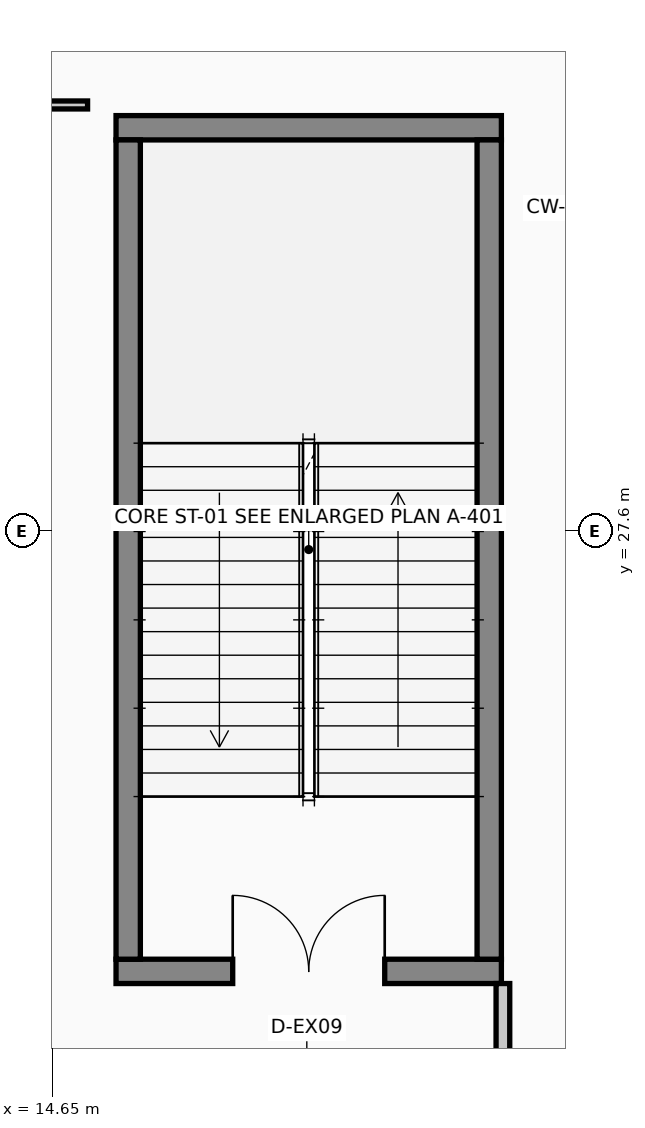
"""IFC4 building model, lengths in metres.
Left out: names, types, materials, properties, quantities, classifications, styles, units other than length and angle.
Written with IfcOpenShell. Run it as: python <this file> out.ifc"""

import sys

from ifc_helpers import new_model, si_unit, direction, frame, frame_2d, origin, place, context, subcontext, project, spatial, rectangle, extrude, element, fill, save


model = new_model("IFC4")
c1 = context("Model", 3, precision=1e-05, world=origin(), true_north=direction((0.0, 1.0)))
c2 = subcontext(c1, "Body", "Model", "MODEL_VIEW")
j1 = project(units=[si_unit("LENGTHUNIT", "METRE"), si_unit("PLANEANGLEUNIT", "RADIAN")], contexts=[c1])
p1 = place(None, origin())
s1 = spatial("IfcSite", under=j1, at=p1, CompositionType="ELEMENT")
p2 = place(p1, origin())
s2 = spatial("IfcBuilding", under=s1, at=p2, CompositionType="ELEMENT")
p3 = place(p2, origin())
s3 = spatial("IfcBuildingStorey", under=s2, at=p3, CompositionType="ELEMENT", Elevation=0.0)
p4 = place(p3, frame((15.49, 21.8, 0.0), z_axis=(0.0, 0.0, 1.0), x_axis=(1.0, 0.0, 0.0)))
e1 = element("IfcWall", 1, at=p4, inside=s3, PredefinedType="SHEAR", context=c2, shape_type="SweptSolid", body=[
    extrude(rectangle(XDim=5.07, YDim=0.32, at=frame_2d((2.535, 0.0))), origin(), (0.0, 0.0, 1.0), 4.58),
])
p5 = place(p4, frame((1.535, 0.0, 0.0)))
e2 = element("IfcOpeningElement", 2, at=p5, cuts=e1, PredefinedType="OPENING", context=c2, shape_type="SweptSolid", body=[
    extrude(rectangle(XDim=2.0, YDim=2.15, at=frame_2d((1.0, 1.075))), frame((0.0, 0.17, 0.0), z_axis=(0.0, -1.0, 0.0), x_axis=(1.0, 0.0, 0.0)), (0.0, 0.0, 1.0), 0.34),
])
p6 = place(p3, frame((15.49, 32.9, 0.0), z_axis=(0.0, 0.0, 1.0), x_axis=(1.0, 0.0, 0.0)))
e3 = element("IfcWall", 3, at=p6, inside=s3, PredefinedType="SHEAR", context=c2, shape_type="SweptSolid", body=[
    extrude(rectangle(XDim=5.07, YDim=0.32, at=frame_2d((2.535, 0.0))), origin(), (0.0, 0.0, 1.0), 4.58),
])
for number, where, z_axis, x_axis in (
    (4, (15.65, 21.96, 0.0), (0.0, 0.0, 1.0), (0.0, 1.0, 0.0)),
    (5, (20.4, 21.96, 0.0), (0.0, 0.0, 1.0), (0.0, 1.0, 0.0)),
):
    element("IfcWall", number, at=place(p3, frame(where, z_axis=z_axis, x_axis=x_axis)), inside=s3, PredefinedType="SHEAR", context=c2, shape_type="SweptSolid", body=[
        extrude(rectangle(XDim=10.78, YDim=0.32, at=frame_2d((5.39, 0.0))), origin(), (0.0, 0.0, 1.0), 4.58),
    ])
p7 = place(p3, frame((7.82, 33.2, 0.0), z_axis=(0.0, 0.0, 1.0), x_axis=(1.0, 0.0, 0.0)))
e6 = element("IfcWall", 6, at=p7, inside=s3, PredefinedType="PARTITIONING", context=c2, shape_type="SweptSolid", body=[
    extrude(rectangle(XDim=7.295, YDim=0.105, at=frame_2d((3.648, 0.0))), origin(), (0.0, 0.0, 1.0), 4.565),
])
p8 = place(p7, frame((2.973, 0.0, 0.0)))
e7 = element("IfcOpeningElement", 7, at=p8, cuts=e6, PredefinedType="OPENING", context=c2, shape_type="SweptSolid", body=[
    extrude(rectangle(XDim=1.35, YDim=2.15, at=frame_2d((0.675, 1.075))), frame((0.0, 0.062, 0.0), z_axis=(0.0, -1.0, 0.0), x_axis=(1.0, 0.0, 0.0)), (0.0, 0.0, 1.0), 0.125),
])
p9 = place(p7, frame((5.073, 0.0, 0.0)))
e8 = element("IfcOpeningElement", 8, at=p9, cuts=e6, PredefinedType="OPENING", context=c2, shape_type="SweptSolid", body=[
    extrude(rectangle(XDim=0.95, YDim=2.1, at=frame_2d((0.475, 1.05))), frame((0.0, 0.062, 0.0), z_axis=(0.0, -1.0, 0.0), x_axis=(1.0, 0.0, 0.0)), (0.0, 0.0, 1.0), 0.125),
])
p10 = place(p3, frame((20.58, 20.55, 0.0), z_axis=(0.0, 0.0, 1.0), x_axis=(0.0, 1.0, 0.0)))
e9 = element("IfcWall", 9, at=p10, inside=s3, PredefinedType="PARTITIONING", context=c2, shape_type="SweptSolid", body=[
    extrude(rectangle(XDim=1.09, YDim=0.18, at=frame_2d((0.545, 0.0))), origin(), (0.0, 0.0, 1.0), 4.565),
])
p11 = place(p5, origin())
e10 = element("IfcDoor", 10, at=p11, inside=s3, OperationType="DOUBLE_DOOR_SINGLE_SWING", PredefinedType="DOOR", context=c2, shape_type="SweptSolid", body=[
    extrude(rectangle(XDim=2.0, YDim=2.15, at=frame_2d((1.0, 1.075))), frame((0.0, 0.025, 0.0), z_axis=(0.0, -1.0, 0.0), x_axis=(1.0, 0.0, 0.0)), (0.0, 0.0, 1.0), 0.05),
])
fill(e2, e10)
save(model, sys.argv[1])
